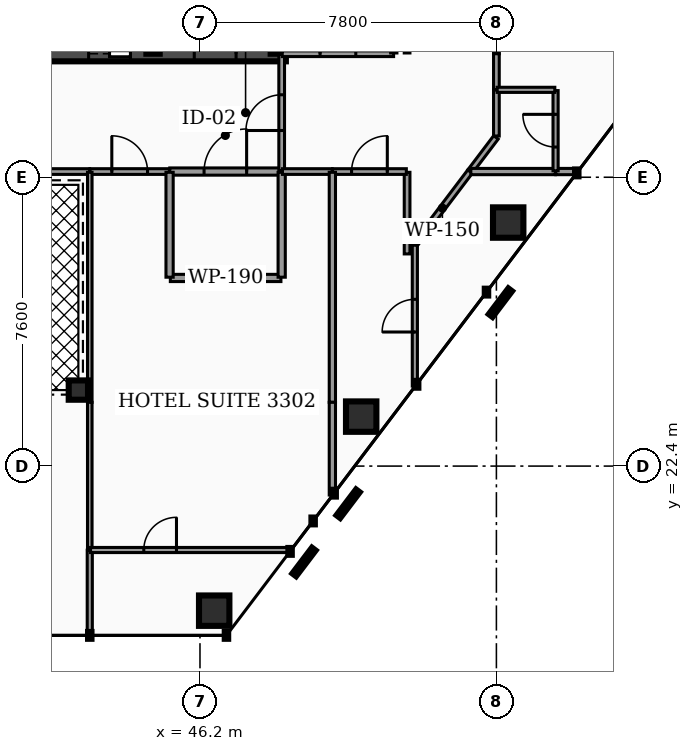
"""IFC4 building model, lengths in metres.
Left out: names, types, materials, properties, quantities, classifications, styles, units other than length and angle.
Written with IfcOpenShell. Run it as: python <this file> out.ifc"""

import sys

from ifc_helpers import new_model, si_unit, direction, frame, frame_2d, origin, origin_2d, place, context, subcontext, project, spatial, rectangle, hollow_rectangle, hollow_circle, extrude, element, fill, save


model = new_model("IFC4")
c1 = context("Model", 3, precision=1e-05, world=origin(), true_north=direction((0.0, 1.0)))
c2 = subcontext(c1, "Body", "Model", "MODEL_VIEW")
j1 = project(units=[si_unit("LENGTHUNIT", "METRE"), si_unit("PLANEANGLEUNIT", "RADIAN")], contexts=[c1])
p1 = place(None, origin())
s1 = spatial("IfcSite", under=j1, at=p1, CompositionType="ELEMENT")
p2 = place(p1, origin())
s2 = spatial("IfcBuilding", under=s1, at=p2, CompositionType="ELEMENT")
p3 = place(p2, frame((0.0, 0.0, 138.38)))
s3 = spatial("IfcBuildingStorey", under=s2, at=p3, CompositionType="ELEMENT", Elevation=138.38)
p4 = place(p3, frame((28.4, 33.25, 0.0), z_axis=(0.0, 0.0, 1.0), x_axis=(1.0, 0.0, 0.0)))
e1 = element("IfcWall", 1, at=p4, inside=s3, PredefinedType="SHEAR", context=c2, shape_type="SweptSolid", body=[
    extrude(rectangle(XDim=20.06, YDim=0.4, at=frame_2d((10.03, 0.0))), origin(), (0.0, 0.0, 1.0), 3.5),
])
p5 = place(p4, frame((4.03, 0.0, 0.0)))
e2 = element("IfcOpeningElement", 2, at=p5, cuts=e1, PredefinedType="OPENING", context=c2, shape_type="SweptSolid", body=[
    extrude(rectangle(XDim=1.1, YDim=2.15, at=frame_2d((0.55, 1.075))), frame((0.0, 0.21, 0.0), z_axis=(0.0, -1.0, 0.0), x_axis=(1.0, 0.0, 0.0)), (0.0, 0.0, 1.0), 0.42),
])
p6 = place(p4, frame((14.87, 0.0, 0.0)))
e3 = element("IfcOpeningElement", 3, at=p6, cuts=e1, PredefinedType="OPENING", context=c2, shape_type="SweptSolid", body=[
    extrude(rectangle(XDim=1.1, YDim=2.15, at=frame_2d((0.55, 1.075))), frame((0.0, 0.21, 0.0), z_axis=(0.0, -1.0, 0.0), x_axis=(1.0, 0.0, 0.0)), (0.0, 0.0, 1.0), 0.42),
])
p7 = place(p4, frame((5.95, 0.0, 0.0)))
e4 = element("IfcOpeningElement", 4, at=p7, cuts=e1, PredefinedType="OPENING", context=c2, shape_type="SweptSolid", body=[
    extrude(rectangle(XDim=1.0, YDim=2.1, at=frame_2d((0.5, 1.05))), frame((0.0, 0.21, 0.0), z_axis=(0.0, -1.0, 0.0), x_axis=(1.0, 0.0, 0.0)), (0.0, 0.0, 1.0), 0.42),
])
p8 = place(p4, frame((7.65, 0.0, 0.0)))
e5 = element("IfcOpeningElement", 5, at=p8, cuts=e1, PredefinedType="OPENING", context=c2, shape_type="SweptSolid", body=[
    extrude(rectangle(XDim=1.0, YDim=2.1, at=frame_2d((0.5, 1.05))), frame((0.0, 0.21, 0.0), z_axis=(0.0, -1.0, 0.0), x_axis=(1.0, 0.0, 0.0)), (0.0, 0.0, 1.0), 0.42),
])
p9 = place(p4, frame((1.31, 0.0, 0.0)))
e6 = element("IfcOpeningElement", 6, at=p9, cuts=e1, PredefinedType="OPENING", context=c2, shape_type="SweptSolid", body=[
    extrude(rectangle(XDim=1.1, YDim=2.2, at=frame_2d((0.55, 1.1))), frame((0.0, 0.21, 0.0), z_axis=(0.0, -1.0, 0.0), x_axis=(1.0, 0.0, 0.0)), (0.0, 0.0, 1.0), 0.42),
])
p10 = place(p4, frame((9.44, 0.0, 0.0)))
e7 = element("IfcOpeningElement", 7, at=p10, cuts=e1, PredefinedType="OPENING", context=c2, shape_type="SweptSolid", body=[
    extrude(rectangle(XDim=1.12, YDim=2.05, at=frame_2d((0.56, 1.025))), frame((0.0, 0.21, 0.0), z_axis=(0.0, -1.0, 0.0), x_axis=(1.0, 0.0, 0.0)), (0.0, 0.0, 1.0), 0.42),
])
p11 = place(p4, frame((17.65, 0.0, 0.0)))
e8 = element("IfcOpeningElement", 8, at=p11, cuts=e1, PredefinedType="OPENING", context=c2, shape_type="SweptSolid", body=[
    extrude(rectangle(XDim=1.1, YDim=2.2, at=frame_2d((0.55, 1.1))), frame((0.0, 0.21, 0.0), z_axis=(0.0, -1.0, 0.0), x_axis=(1.0, 0.0, 0.0)), (0.0, 0.0, 1.0), 0.42),
])
p12 = place(p3, frame((44.965, 33.25, 0.0), z_axis=(0.0, 0.0, 1.0), x_axis=(0.0, 1.0, 0.0)))
e9 = element("IfcWall", 9, at=p12, inside=s3, PredefinedType="SHEAR", context=c2, shape_type="SweptSolid", body=[
    extrude(rectangle(XDim=10.2, YDim=0.35, at=frame_2d((5.1, 0.0))), origin(), (0.0, 0.0, 1.0), 3.5),
])
p13 = place(p3, frame((48.26, 33.25, 0.0), z_axis=(0.0, 0.0, 1.0), x_axis=(0.0, 1.0, 0.0)))
e10 = element("IfcWall", 10, at=p13, inside=s3, PredefinedType="SHEAR", context=c2, shape_type="SweptSolid", body=[
    extrude(rectangle(XDim=10.2, YDim=0.4, at=frame_2d((5.1, 0.0))), origin(), (0.0, 0.0, 1.0), 3.5),
])
for number, where, z_axis, x_axis in (
    (11, (46.574, 18.596, 0.0), (0.0, 0.0, 1.0), (1.0, 0.0, 0.0)),
    (12, (50.442, 23.702, 0.0), (0.0, 0.0, 1.0), (1.0, 0.0, 0.0)),
    (13, (54.31, 28.808, 0.0), (0.0, 0.0, 1.0), (1.0, 0.0, 0.0)),
):
    element("IfcColumn", number, at=place(p3, frame(where, z_axis=z_axis, x_axis=x_axis)), inside=s3, PredefinedType="COLUMN", context=c2, shape_type="SweptSolid", body=[
        extrude(hollow_rectangle(XDim=0.8, YDim=0.8, WallThickness=0.04, at=origin_2d()), origin(), (0.0, 0.0, 1.0), 3.5),
    ])
p14 = place(p3, frame((43.0, 24.4, 0.0), z_axis=(0.0, 0.0, 1.0), x_axis=(1.0, 0.0, 0.0)))
e14 = element("IfcColumn", 14, at=p14, inside=s3, PredefinedType="COLUMN", context=c2, shape_type="SweptSolid", body=[
    extrude(hollow_circle(Radius=0.254, WallThickness=0.02, at=origin_2d()), origin(), (0.0, 0.0, 1.0), 3.5),
])
p15 = place(p3, frame((45.405, 30.15, 0.0), z_axis=(0.0, 0.0, 1.0), x_axis=(1.0, 0.0, 0.0)))
e15 = element("IfcWall", 15, at=p15, inside=s3, PredefinedType="PARTITIONING", context=c2, shape_type="SweptSolid", body=[
    extrude(rectangle(XDim=2.925, YDim=0.19, at=frame_2d((1.462, 0.0))), origin(), (0.0, 0.0, 1.0), 2.457),
])
p16 = place(p15, frame((0.903, 0.0, 0.0)))
e16 = element("IfcOpeningElement", 16, at=p16, cuts=e15, PredefinedType="OPENING", context=c2, shape_type="SweptSolid", body=[
    extrude(rectangle(XDim=1.12, YDim=2.05, at=frame_2d((0.56, 1.025))), frame((0.0, 0.105, 0.0), z_axis=(0.0, -1.0, 0.0), x_axis=(1.0, 0.0, 0.0)), (0.0, 0.0, 1.0), 0.21),
])
p17 = place(p3, frame((48.35, 30.17, 0.0), z_axis=(0.0, 0.0, 1.0), x_axis=(0.0, 1.0, 0.0)))
e17 = element("IfcWall", 17, at=p17, inside=s3, PredefinedType="PARTITIONING", context=c2, shape_type="SweptSolid", body=[
    extrude(rectangle(XDim=3.06, YDim=0.15, at=frame_2d((1.53, 0.0))), origin(), (0.0, 0.0, 1.0), 2.457),
])
p18 = place(p17, frame((1.06, 0.0, 0.0)))
e18 = element("IfcOpeningElement", 18, at=p18, cuts=e17, PredefinedType="OPENING", context=c2, shape_type="SweptSolid", body=[
    extrude(rectangle(XDim=0.94, YDim=2.05, at=frame_2d((0.47, 1.025))), frame((0.0, 0.085, 0.0), z_axis=(0.0, -1.0, 0.0), x_axis=(1.0, 0.0, 0.0)), (0.0, 0.0, 1.0), 0.17),
])
p19 = place(p3, frame((35.385, 30.15, 0.0), z_axis=(0.0, 0.0, 1.0), x_axis=(1.0, 0.0, 0.0)))
e19 = element("IfcWall", 19, at=p19, inside=s3, PredefinedType="PARTITIONING", context=c2, shape_type="SweptSolid", body=[
    extrude(rectangle(XDim=7.91, YDim=0.15, at=frame_2d((3.955, 0.0))), origin(), (0.0, 0.0, 1.0), 2.457),
])
p20 = place(p19, frame((0.25, 0.0, 0.0)))
e20 = element("IfcOpeningElement", 20, at=p20, cuts=e19, PredefinedType="OPENING", context=c2, shape_type="SweptSolid", body=[
    extrude(rectangle(XDim=0.88, YDim=2.05, at=frame_2d((0.44, 1.025))), frame((0.0, 0.085, 0.0), z_axis=(0.0, -1.0, 0.0), x_axis=(1.0, 0.0, 0.0)), (0.0, 0.0, 1.0), 0.17),
])
p21 = place(p3, frame((43.305, 30.15, 0.0), z_axis=(0.0, 0.0, 1.0), x_axis=(1.0, 0.0, 0.0)))
e21 = element("IfcWall", 21, at=p21, inside=s3, PredefinedType="PARTITIONING", context=c2, shape_type="SweptSolid", body=[
    extrude(rectangle(XDim=2.09, YDim=0.15, at=frame_2d((1.045, 0.0))), origin(), (0.0, 0.0, 1.0), 2.457),
])
p22 = place(p21, frame((0.575, 0.0, 0.0)))
e22 = element("IfcOpeningElement", 22, at=p22, cuts=e21, PredefinedType="OPENING", context=c2, shape_type="SweptSolid", body=[
    extrude(rectangle(XDim=0.94, YDim=2.05, at=frame_2d((0.47, 1.025))), frame((0.0, 0.085, 0.0), z_axis=(0.0, -1.0, 0.0), x_axis=(1.0, 0.0, 0.0)), (0.0, 0.0, 1.0), 0.17),
])
p23 = place(p3, frame((45.42, 27.35, 0.0), z_axis=(0.0, 0.0, 1.0), x_axis=(1.0, 0.0, 0.0)))
e23 = element("IfcWall", 23, at=p23, inside=s3, PredefinedType="PARTITIONING", context=c2, shape_type="SweptSolid", body=[
    extrude(rectangle(XDim=2.91, YDim=0.19, at=frame_2d((1.455, 0.0))), origin(), (0.0, 0.0, 1.0), 2.457),
])
for number, where, z_axis, x_axis in (
    (24, (45.4, 27.37, 0.0), (0.0, 0.0, 1.0), (0.0, 1.0, 0.0)),
    (25, (48.35, 27.37, 0.0), (0.0, 0.0, 1.0), (0.0, 1.0, 0.0)),
):
    element("IfcWall", number, at=place(p3, frame(where, z_axis=z_axis, x_axis=x_axis)), inside=s3, PredefinedType="PARTITIONING", context=c2, shape_type="SweptSolid", body=[
        extrude(rectangle(XDim=2.76, YDim=0.19, at=frame_2d((1.38, 0.0))), origin(), (0.0, 0.0, 1.0), 2.457),
    ])
p24 = place(p3, frame((48.37, 30.15, 0.0), z_axis=(0.0, 0.0, 1.0), x_axis=(1.0, 0.0, 0.0)))
e26 = element("IfcWall", 26, at=p24, inside=s3, PredefinedType="PARTITIONING", context=c2, shape_type="SweptSolid", body=[
    extrude(rectangle(XDim=1.309, YDim=0.15, at=frame_2d((0.654, 0.0))), origin(), (0.0, 0.0, 1.0), 2.457),
])
p25 = place(p3, frame((51.65, 27.982, 0.0), z_axis=(0.0, 0.0, 1.0), x_axis=(0.0, 1.0, 0.0)))
e27 = element("IfcWall", 27, at=p25, inside=s3, PredefinedType="PARTITIONING", context=c2, shape_type="SweptSolid", body=[
    extrude(rectangle(XDim=2.147, YDim=0.15, at=frame_2d((1.074, 0.0))), origin(), (0.0, 0.0, 1.0), 2.457),
])
p26 = place(p3, frame((49.689, 30.15, 0.0), z_axis=(0.0, 0.0, 1.0), x_axis=(1.0, 0.0, 0.0)))
e28 = element("IfcWall", 28, at=p26, inside=s3, PredefinedType="PARTITIONING", context=c2, shape_type="SweptSolid", body=[
    extrude(rectangle(XDim=1.941, YDim=0.15, at=frame_2d((0.971, 0.0))), origin(), (0.0, 0.0, 1.0), 2.457),
])
p27 = place(p26, frame((0.501, 0.0, 0.0)))
e29 = element("IfcOpeningElement", 29, at=p27, cuts=e28, PredefinedType="OPENING", context=c2, shape_type="SweptSolid", body=[
    extrude(rectangle(XDim=0.94, YDim=2.05, at=frame_2d((0.47, 1.025))), frame((0.0, 0.085, 0.0), z_axis=(0.0, -1.0, 0.0), x_axis=(1.0, 0.0, 0.0)), (0.0, 0.0, 1.0), 0.17),
])
p28 = place(p3, frame((51.851, 28.228, 0.0), z_axis=(0.0, 0.0, 1.0), x_axis=(0.60378553019, 0.797146808018, 0.0)))
e30 = element("IfcWall", 30, at=p28, inside=s3, PredefinedType="PARTITIONING", context=c2, shape_type="SweptSolid", body=[
    extrude(rectangle(XDim=2.41, YDim=0.15, at=frame_2d((1.205, 0.0))), origin(), (0.0, 0.0, 1.0), 2.457),
])
p29 = place(p3, frame((54.0, 33.25, 0.0), z_axis=(0.0, 0.0, 1.0), x_axis=(0.0, 1.0, 0.0)))
e31 = element("IfcWall", 31, at=p29, inside=s3, PredefinedType="PARTITIONING", context=c2, shape_type="SweptSolid", body=[
    extrude(rectangle(XDim=6.365, YDim=0.15, at=frame_2d((3.183, 0.0))), origin(), (0.0, 0.0, 1.0), 2.457),
])
p30 = place(p29, frame((2.712, 0.0, 0.0)))
e32 = element("IfcOpeningElement", 32, at=p30, cuts=e31, PredefinedType="OPENING", context=c2, shape_type="SweptSolid", body=[
    extrude(rectangle(XDim=0.94, YDim=2.05, at=frame_2d((0.47, 1.025))), frame((0.0, 0.085, 0.0), z_axis=(0.0, -1.0, 0.0), x_axis=(1.0, 0.0, 0.0)), (0.0, 0.0, 1.0), 0.17),
])
p31 = place(p3, frame((54.0, 32.305, 0.0), z_axis=(0.0, 0.0, 1.0), x_axis=(0.0, 1.0, 0.0)))
e33 = element("IfcWall", 33, at=p31, inside=s3, PredefinedType="PARTITIONING", context=c2, shape_type="SweptSolid", body=[
    extrude(rectangle(XDim=0.945, YDim=0.15, at=frame_2d((0.473, 0.0))), origin(), (0.0, 0.0, 1.0), 2.457),
])
p32 = place(p3, frame((54.0, 31.085, 0.0), z_axis=(0.0, 0.0, 1.0), x_axis=(0.0, 1.0, 0.0)))
e34 = element("IfcWall", 34, at=p32, inside=s3, PredefinedType="PARTITIONING", context=c2, shape_type="SweptSolid", body=[
    extrude(rectangle(XDim=1.21, YDim=0.15, at=frame_2d((0.605, 0.0))), origin(), (0.0, 0.0, 1.0), 2.457),
])
p33 = place(p3, frame((53.31, 30.154, 0.0), z_axis=(0.0, 0.0, 1.0), x_axis=(0.603752960425, 0.797171476395, 0.0)))
e35 = element("IfcWall", 35, at=p33, inside=s3, PredefinedType="PARTITIONING", context=c2, shape_type="SweptSolid", body=[
    extrude(rectangle(XDim=1.122, YDim=0.15, at=frame_2d((0.561, 0.0))), origin(), (0.0, 0.0, 1.0), 2.457),
])
p34 = place(p3, frame((51.65, 33.27, 0.0), z_axis=(0.0, 0.0, 1.0), x_axis=(0.0, 1.0, 0.0)))
e36 = element("IfcWall", 36, at=p34, inside=s3, PredefinedType="PARTITIONING", context=c2, shape_type="SweptSolid", body=[
    extrude(rectangle(XDim=9.21, YDim=0.15, at=frame_2d((4.605, 0.0))), origin(), (0.0, 0.0, 1.0), 2.457),
])
p35 = place(p3, frame((48.365, 33.25, 0.0), z_axis=(0.0, 0.0, 1.0), x_axis=(1.0, 0.0, 0.0)))
e37 = element("IfcWall", 37, at=p35, inside=s3, PredefinedType="PARTITIONING", context=c2, shape_type="SweptSolid", body=[
    extrude(rectangle(XDim=2.93, YDim=0.15, at=frame_2d((1.465, 0.0))), origin(), (0.0, 0.0, 1.0), 2.457),
])
p36 = place(p35, frame((0.995, 0.0, 0.0)))
e38 = element("IfcOpeningElement", 38, at=p36, cuts=e37, PredefinedType="OPENING", context=c2, shape_type="SweptSolid", body=[
    extrude(rectangle(XDim=0.94, YDim=2.05, at=frame_2d((0.47, 1.025))), frame((0.0, 0.085, 0.0), z_axis=(0.0, -1.0, 0.0), x_axis=(1.0, 0.0, 0.0)), (0.0, 0.0, 1.0), 0.17),
])
p37 = place(p3, frame((43.3, 24.078, 0.0), z_axis=(0.0, 0.0, 1.0), x_axis=(0.0, 1.0, 0.0)))
e39 = element("IfcWall", 39, at=p37, inside=s3, PredefinedType="PARTITIONING", context=c2, shape_type="SweptSolid", body=[
    extrude(rectangle(XDim=6.052, YDim=0.12, at=frame_2d((3.026, 0.0))), origin(), (0.0, 0.0, 1.0), 2.457),
])
p38 = place(p3, frame((43.3, 20.197, 0.0), z_axis=(0.0, 0.0, 1.0), x_axis=(0.0, 1.0, 0.0)))
e40 = element("IfcWall", 40, at=p38, inside=s3, PredefinedType="PARTITIONING", context=c2, shape_type="SweptSolid", body=[
    extrude(rectangle(XDim=3.881, YDim=0.12, at=frame_2d((1.94, 0.0))), origin(), (0.0, 0.0, 1.0), 2.457),
])
p39 = place(p3, frame((43.3, 17.961, 0.0), z_axis=(0.0, 0.0, 1.0), x_axis=(0.0, 1.0, 0.0)))
e41 = element("IfcWall", 41, at=p39, inside=s3, PredefinedType="PARTITIONING", context=c2, shape_type="SweptSolid", body=[
    extrude(rectangle(XDim=2.226, YDim=0.135, at=frame_2d((1.113, 0.0))), origin(), (0.0, 0.0, 1.0), 2.457),
])
p40 = place(p3, frame((43.32, 20.192, 0.0), z_axis=(0.0, 0.0, 1.0), x_axis=(1.0, 0.0, 0.0)))
e42 = element("IfcWall", 42, at=p40, inside=s3, PredefinedType="PARTITIONING", context=c2, shape_type="SweptSolid", body=[
    extrude(rectangle(XDim=5.263, YDim=0.135, at=frame_2d((2.632, 0.0))), origin(), (0.0, 0.0, 1.0), 2.457),
])
p41 = place(p40, frame((1.402, 0.0, 0.0)))
e43 = element("IfcOpeningElement", 43, at=p41, cuts=e42, PredefinedType="OPENING", context=c2, shape_type="SweptSolid", body=[
    extrude(rectangle(XDim=0.86, YDim=2.05, at=frame_2d((0.43, 1.025))), frame((0.0, 0.077, 0.0), z_axis=(0.0, -1.0, 0.0), x_axis=(1.0, 0.0, 0.0)), (0.0, 0.0, 1.0), 0.155),
])
p42 = place(p3, frame((49.684, 24.078, 0.0), z_axis=(0.0, 0.0, 1.0), x_axis=(0.0, 1.0, 0.0)))
e44 = element("IfcWall", 44, at=p42, inside=s3, PredefinedType="PARTITIONING", context=c2, shape_type="SweptSolid", body=[
    extrude(rectangle(XDim=6.052, YDim=0.165, at=frame_2d((3.026, 0.0))), origin(), (0.0, 0.0, 1.0), 2.457),
])
p43 = place(p3, frame((49.684, 21.639, 0.0), z_axis=(0.0, 0.0, 1.0), x_axis=(0.0, 1.0, 0.0)))
e45 = element("IfcWall", 45, at=p43, inside=s3, PredefinedType="PARTITIONING", context=c2, shape_type="SweptSolid", body=[
    extrude(rectangle(XDim=2.438, YDim=0.165, at=frame_2d((1.219, 0.0))), origin(), (0.0, 0.0, 1.0), 2.457),
])
p44 = place(p3, frame((51.854, 24.504, 0.0), z_axis=(0.0, 0.0, 1.0), x_axis=(0.0, 1.0, 0.0)))
e46 = element("IfcWall", 46, at=p44, inside=s3, PredefinedType="PARTITIONING", context=c2, shape_type="SweptSolid", body=[
    extrude(rectangle(XDim=3.708, YDim=0.135, at=frame_2d((1.854, 0.0))), origin(), (0.0, 0.0, 1.0), 2.457),
])
p45 = place(p44, frame((1.424, 0.0, 0.0)))
e47 = element("IfcOpeningElement", 47, at=p45, cuts=e46, PredefinedType="OPENING", context=c2, shape_type="SweptSolid", body=[
    extrude(rectangle(XDim=0.86, YDim=2.05, at=frame_2d((0.43, 1.025))), frame((0.0, 0.077, 0.0), z_axis=(0.0, -1.0, 0.0), x_axis=(1.0, 0.0, 0.0)), (0.0, 0.0, 1.0), 0.155),
])
p46 = place(p3, frame((55.562, 30.15, 0.0), z_axis=(0.0, 0.0, 1.0), x_axis=(1.0, 0.0, 0.0)))
e48 = element("IfcWall", 48, at=p46, inside=s3, PredefinedType="PARTITIONING", context=c2, shape_type="SweptSolid", body=[
    extrude(rectangle(XDim=0.565, YDim=0.165, at=frame_2d((0.283, 0.0))), origin(), (0.0, 0.0, 1.0), 2.457),
])
p47 = place(p3, frame((53.327, 30.15, 0.0), z_axis=(0.0, 0.0, 1.0), x_axis=(1.0, 0.0, 0.0)))
e49 = element("IfcWall", 49, at=p47, inside=s3, PredefinedType="PARTITIONING", context=c2, shape_type="SweptSolid", body=[
    extrude(rectangle(XDim=2.225, YDim=0.165, at=frame_2d((1.113, 0.0))), origin(), (0.0, 0.0, 1.0), 2.457),
])
p48 = place(p3, frame((55.557, 30.17, 0.0), z_axis=(0.0, 0.0, 1.0), x_axis=(0.0, 1.0, 0.0)))
e50 = element("IfcWall", 50, at=p48, inside=s3, PredefinedType="PARTITIONING", context=c2, shape_type="SweptSolid", body=[
    extrude(rectangle(XDim=2.11, YDim=0.135, at=frame_2d((1.055, 0.0))), origin(), (0.0, 0.0, 1.0), 2.457),
])
p49 = place(p48, frame((0.625, 0.0, 0.0)))
e51 = element("IfcOpeningElement", 51, at=p49, cuts=e50, PredefinedType="OPENING", context=c2, shape_type="SweptSolid", body=[
    extrude(rectangle(XDim=0.86, YDim=2.05, at=frame_2d((0.43, 1.025))), frame((0.0, 0.077, 0.0), z_axis=(0.0, -1.0, 0.0), x_axis=(1.0, 0.0, 0.0)), (0.0, 0.0, 1.0), 0.155),
])
p50 = place(p3, frame((54.02, 32.3, 0.0), z_axis=(0.0, 0.0, 1.0), x_axis=(1.0, 0.0, 0.0)))
e52 = element("IfcWall", 52, at=p50, inside=s3, PredefinedType="PARTITIONING", context=c2, shape_type="SweptSolid", body=[
    extrude(rectangle(XDim=1.517, YDim=0.135, at=frame_2d((0.759, 0.0))), origin(), (0.0, 0.0, 1.0), 2.457),
])
p51 = place(p3, frame((51.3, 33.27, 0.0), z_axis=(0.0, 0.0, 1.0), x_axis=(0.0, 1.0, 0.0)))
e53 = element("IfcWall", 53, at=p51, inside=s3, PredefinedType="PARTITIONING", context=c2, shape_type="SweptSolid", body=[
    extrude(rectangle(XDim=5.202, YDim=0.165, at=frame_2d((2.601, 0.0))), origin(), (0.0, 0.0, 1.0), 2.457),
])
p52 = place(p6, origin())
e54 = element("IfcDoor", 54, at=p52, inside=s3, OperationType="SLIDING_TO_RIGHT", PredefinedType="DOOR", context=c2, shape_type="SweptSolid", body=[
    extrude(rectangle(XDim=1.1, YDim=2.15, at=frame_2d((0.55, 1.075))), frame((0.0, 0.025, 0.0), z_axis=(0.0, -1.0, 0.0), x_axis=(1.0, 0.0, 0.0)), (0.0, 0.0, 1.0), 0.05),
])
fill(e3, e54)
p53 = place(p11, origin())
e55 = element("IfcDoor", 55, at=p53, inside=s3, OperationType="SINGLE_SWING_RIGHT", PredefinedType="DOOR", context=c2, shape_type="SweptSolid", body=[
    extrude(rectangle(XDim=1.1, YDim=2.2, at=frame_2d((0.55, 1.1))), frame((0.0, 0.025, 0.0), z_axis=(0.0, -1.0, 0.0), x_axis=(1.0, 0.0, 0.0)), (0.0, 0.0, 1.0), 0.05),
])
fill(e8, e55)
p54 = place(p16, origin())
e56 = element("IfcDoor", 56, at=p54, inside=s3, OperationType="SINGLE_SWING_RIGHT", PredefinedType="DOOR", context=c2, shape_type="SweptSolid", body=[
    extrude(rectangle(XDim=1.12, YDim=2.05, at=frame_2d((0.56, 1.025))), frame((0.0, 0.025, 0.0), z_axis=(0.0, -1.0, 0.0), x_axis=(1.0, 0.0, 0.0)), (0.0, 0.0, 1.0), 0.05),
])
fill(e16, e56)
p55 = place(p18, origin())
e57 = element("IfcDoor", 57, at=p55, inside=s3, OperationType="SINGLE_SWING_LEFT", PredefinedType="DOOR", context=c2, shape_type="SweptSolid", body=[
    extrude(rectangle(XDim=0.94, YDim=2.05, at=frame_2d((0.47, 1.025))), frame((0.0, 0.025, 0.0), z_axis=(0.0, -1.0, 0.0), x_axis=(1.0, 0.0, 0.0)), (0.0, 0.0, 1.0), 0.05),
])
fill(e18, e57)
p56 = place(p22, origin())
e58 = element("IfcDoor", 58, at=p56, inside=s3, OperationType="SINGLE_SWING_LEFT", PredefinedType="DOOR", context=c2, shape_type="SweptSolid", body=[
    extrude(rectangle(XDim=0.94, YDim=2.05, at=frame_2d((0.47, 1.025))), frame((0.0, 0.025, 0.0), z_axis=(0.0, -1.0, 0.0), x_axis=(1.0, 0.0, 0.0)), (0.0, 0.0, 1.0), 0.05),
])
fill(e22, e58)
p57 = place(p27, origin())
e59 = element("IfcDoor", 59, at=p57, inside=s3, OperationType="SINGLE_SWING_RIGHT", PredefinedType="DOOR", context=c2, shape_type="SweptSolid", body=[
    extrude(rectangle(XDim=0.94, YDim=2.05, at=frame_2d((0.47, 1.025))), frame((0.0, 0.025, 0.0), z_axis=(0.0, -1.0, 0.0), x_axis=(1.0, 0.0, 0.0)), (0.0, 0.0, 1.0), 0.05),
])
fill(e29, e59)
p58 = place(p36, origin())
e60 = element("IfcDoor", 60, at=p58, inside=s3, OperationType="SINGLE_SWING_LEFT", PredefinedType="DOOR", context=c2, shape_type="SweptSolid", body=[
    extrude(rectangle(XDim=0.94, YDim=2.05, at=frame_2d((0.47, 1.025))), frame((0.0, 0.025, 0.0), z_axis=(0.0, -1.0, 0.0), x_axis=(1.0, 0.0, 0.0)), (0.0, 0.0, 1.0), 0.05),
])
fill(e38, e60)
p59 = place(p41, origin())
e61 = element("IfcDoor", 61, at=p59, inside=s3, OperationType="SINGLE_SWING_RIGHT", PredefinedType="DOOR", context=c2, shape_type="SweptSolid", body=[
    extrude(rectangle(XDim=0.86, YDim=2.05, at=frame_2d((0.43, 1.025))), frame((0.0, 0.025, 0.0), z_axis=(0.0, -1.0, 0.0), x_axis=(1.0, 0.0, 0.0)), (0.0, 0.0, 1.0), 0.05),
])
fill(e43, e61)
p60 = place(p45, origin())
e62 = element("IfcDoor", 62, at=p60, inside=s3, OperationType="SINGLE_SWING_LEFT", PredefinedType="DOOR", context=c2, shape_type="SweptSolid", body=[
    extrude(rectangle(XDim=0.86, YDim=2.05, at=frame_2d((0.43, 1.025))), frame((0.0, 0.025, 0.0), z_axis=(0.0, -1.0, 0.0), x_axis=(1.0, 0.0, 0.0)), (0.0, 0.0, 1.0), 0.05),
])
fill(e47, e62)
p61 = place(p49, origin())
e63 = element("IfcDoor", 63, at=p61, inside=s3, OperationType="SINGLE_SWING_RIGHT", PredefinedType="DOOR", context=c2, shape_type="SweptSolid", body=[
    extrude(rectangle(XDim=0.86, YDim=2.05, at=frame_2d((0.43, 1.025))), frame((0.0, 0.025, 0.0), z_axis=(0.0, -1.0, 0.0), x_axis=(1.0, 0.0, 0.0)), (0.0, 0.0, 1.0), 0.05),
])
fill(e51, e63)
save(model, sys.argv[1])
